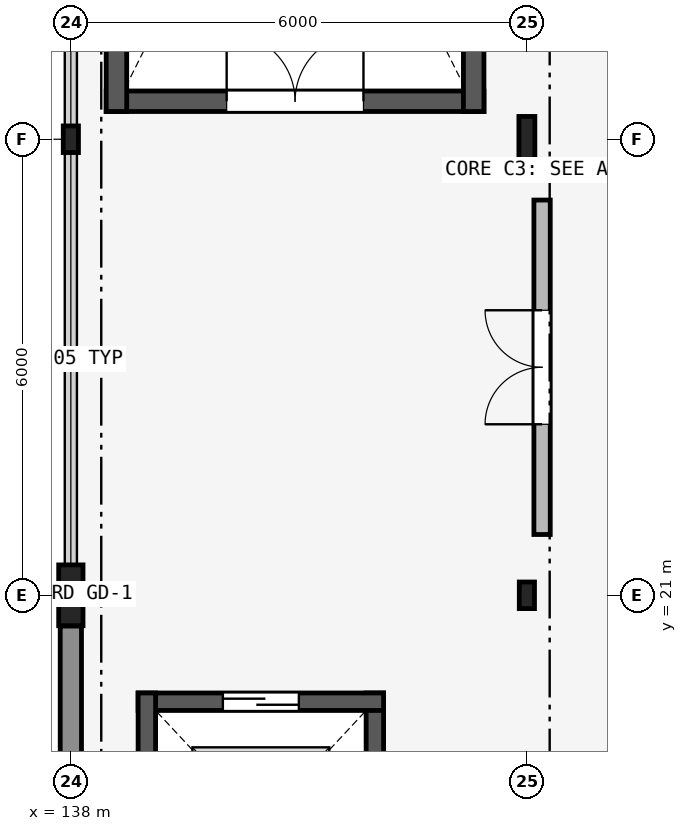
"""IFC4 building model, lengths in metres.
Left out: names, types, materials, properties, quantities, classifications, styles, units other than length and angle.
Written with IfcOpenShell. Run it as: python <this file> out.ifc"""

import sys

from ifc_helpers import new_model, si_unit, direction, frame, frame_2d, origin, origin_2d, place, context, subcontext, project, spatial, rectangle, hollow_rectangle, i_section, extrude, element, fill, save


model = new_model("IFC4")
c1 = context("Model", 3, precision=1e-05, world=origin(), true_north=direction((0.0, 1.0)))
c2 = subcontext(c1, "Body", "Model", "MODEL_VIEW")
j1 = project(units=[si_unit("LENGTHUNIT", "METRE"), si_unit("PLANEANGLEUNIT", "RADIAN")], contexts=[c1])
p1 = place(None, origin())
s1 = spatial("IfcSite", under=j1, at=p1, CompositionType="ELEMENT")
p2 = place(p1, origin())
s2 = spatial("IfcBuilding", under=s1, at=p2, CompositionType="ELEMENT")
p3 = place(p2, frame((0.0, 0.0, 9.3)))
s3 = spatial("IfcBuildingStorey", under=s2, at=p3, CompositionType="ELEMENT", Elevation=9.3)
p4 = place(p3, frame((138.0, 21.0, 0.0), z_axis=(0.0, 0.0, 1.0), x_axis=(1.0, 0.0, 0.0)))
e1 = element("IfcColumn", 1, at=p4, inside=s3, PredefinedType="COLUMN", context=c2, shape_type="SweptSolid", body=[
    extrude(i_section(OverallWidth=0.32, OverallDepth=0.8, WebThickness=0.016, FlangeThickness=0.028, at=origin_2d()), origin(), (0.0, 0.0, 1.0), 4.2),
])
for number, where, z_axis, x_axis in (
    (2, (138.0, 27.0, 0.0), (0.0, 0.0, 1.0), (1.0, 0.0, 0.0)),
    (3, (144.0, 21.0, 0.0), (0.0, 0.0, 1.0), (1.0, 0.0, 0.0)),
):
    element("IfcColumn", number, at=place(p3, frame(where, z_axis=z_axis, x_axis=x_axis)), inside=s3, PredefinedType="COLUMN", context=c2, shape_type="SweptSolid", body=[
        extrude(hollow_rectangle(XDim=0.2, YDim=0.35, WallThickness=0.012, InnerFilletRadius=0.012, OuterFilletRadius=0.024, at=origin_2d()), origin(), (0.0, 0.0, 1.0), 4.2),
    ])
p5 = place(p3, frame((144.0, 27.0, 0.0), z_axis=(0.0, 0.0, 1.0), x_axis=(1.0, 0.0, 0.0)))
e4 = element("IfcColumn", 4, at=p5, inside=s3, PredefinedType="COLUMN", context=c2, shape_type="SweptSolid", body=[
    extrude(i_section(OverallWidth=0.21, OverallDepth=0.6, WebThickness=0.012, FlangeThickness=0.021, FilletRadius=0.02, at=origin_2d()), origin(), (0.0, 0.0, 1.0), 4.2),
])
p6 = place(p3, frame((138.0, 15.304, 0.0), z_axis=(0.0, 0.0, 1.0), x_axis=(0.0, 1.0, 0.0)))
e5 = element("IfcWall", 5, at=p6, inside=s3, PredefinedType="SOLIDWALL", context=c2, shape_type="SweptSolid", body=[
    extrude(rectangle(XDim=5.292, YDim=0.28, at=frame_2d((2.646, 0.0))), origin(), (0.0, 0.0, 1.0), 3.39),
])
p7 = place(p3, frame((138.465, 27.5, 0.0), z_axis=(0.0, 0.0, 1.0), x_axis=(1.0, 0.0, 0.0)))
e6 = element("IfcWall", 6, at=p7, inside=s3, PredefinedType="SHEAR", context=c2, shape_type="SweptSolid", body=[
    extrude(rectangle(XDim=4.97, YDim=0.27, at=frame_2d((2.485, 0.0))), origin(), (0.0, 0.0, 1.0), 4.06),
])
p8 = place(p7, frame((1.585, 0.0, 0.0)))
e7 = element("IfcOpeningElement", 7, at=p8, cuts=e6, PredefinedType="OPENING", context=c2, shape_type="SweptSolid", body=[
    extrude(rectangle(XDim=1.8, YDim=2.2, at=frame_2d((0.9, 1.1))), frame((0.0, 0.145, 0.0), z_axis=(0.0, -1.0, 0.0), x_axis=(1.0, 0.0, 0.0)), (0.0, 0.0, 1.0), 0.29),
])
for number, where, z_axis, x_axis in (
    (8, (143.3, 27.365, 0.0), (0.0, 0.0, 1.0), (0.0, 1.0, 0.0)),
    (9, (138.6, 36.935, 0.0), (0.0, 0.0, 1.0), (0.0, -1.0, 0.0)),
):
    element("IfcWall", number, at=place(p3, frame(where, z_axis=z_axis, x_axis=x_axis)), inside=s3, PredefinedType="SHEAR", context=c2, shape_type="SweptSolid", body=[
        extrude(rectangle(XDim=9.57, YDim=0.27, at=frame_2d((4.785, 0.0))), origin(), (0.0, 0.0, 1.0), 4.06),
    ])
p9 = place(p3, frame((144.2, 21.8, 0.0), z_axis=(0.0, 0.0, 1.0), x_axis=(0.0, 1.0, 0.0)))
e10 = element("IfcWall", 10, at=p9, inside=s3, PredefinedType="PARTITIONING", context=c2, shape_type="SweptSolid", body=[
    extrude(rectangle(XDim=4.4, YDim=0.215, at=frame_2d((2.2, 0.0))), origin(), (0.0, 0.0, 1.0), 3.44),
])
p10 = place(p9, frame((1.45, 0.0, 0.0)))
e11 = element("IfcOpeningElement", 11, at=p10, cuts=e10, PredefinedType="OPENING", context=c2, shape_type="SweptSolid", body=[
    extrude(rectangle(XDim=1.5, YDim=2.15, at=frame_2d((0.75, 1.075))), frame((0.0, 0.117, 0.0), z_axis=(0.0, -1.0, 0.0), x_axis=(1.0, 0.0, 0.0)), (0.0, 0.0, 1.0), 0.235),
])
p11 = place(p3, frame((142.0, 16.285, 0.0), z_axis=(0.0, 0.0, 1.0), x_axis=(0.0, 1.0, 0.0)))
e12 = element("IfcWall", 12, at=p11, inside=s3, PredefinedType="SHEAR", context=c2, shape_type="SweptSolid", body=[
    extrude(rectangle(XDim=3.43, YDim=0.23, at=frame_2d((1.715, 0.0))), origin(), (0.0, 0.0, 1.0), 4.2),
])
p12 = place(p3, frame((142.115, 19.6, 0.0), z_axis=(0.0, 0.0, 1.0), x_axis=(-1.0, 0.0, 0.0)))
e13 = element("IfcWall", 13, at=p12, inside=s3, PredefinedType="SHEAR", context=c2, shape_type="SweptSolid", body=[
    extrude(rectangle(XDim=3.23, YDim=0.23, at=frame_2d((1.615, 0.0))), origin(), (0.0, 0.0, 1.0), 4.2),
])
p13 = place(p12, frame((1.115, 0.0, 0.0)))
e14 = element("IfcOpeningElement", 14, at=p13, cuts=e13, PredefinedType="OPENING", context=c2, shape_type="SweptSolid", body=[
    extrude(rectangle(XDim=1.0, YDim=2.15, at=frame_2d((0.5, 1.075))), frame((0.0, 0.125, 0.0), z_axis=(0.0, -1.0, 0.0), x_axis=(1.0, 0.0, 0.0)), (0.0, 0.0, 1.0), 0.25),
])
p14 = place(p3, frame((139.0, 19.715, 0.0), z_axis=(0.0, 0.0, 1.0), x_axis=(0.0, -1.0, 0.0)))
e15 = element("IfcWall", 15, at=p14, inside=s3, PredefinedType="SHEAR", context=c2, shape_type="SweptSolid", body=[
    extrude(rectangle(XDim=3.43, YDim=0.23, at=frame_2d((1.715, 0.0))), origin(), (0.0, 0.0, 1.0), 4.2),
])
p15 = place(p8, origin())
e16 = element("IfcDoor", 16, at=p15, inside=s3, OperationType="DOUBLE_DOOR_SINGLE_SWING", PredefinedType="DOOR", context=c2, shape_type="SweptSolid", body=[
    extrude(rectangle(XDim=1.8, YDim=2.2, at=frame_2d((0.9, 1.1))), frame((0.0, 0.025, 0.0), z_axis=(0.0, -1.0, 0.0), x_axis=(1.0, 0.0, 0.0)), (0.0, 0.0, 1.0), 0.05),
])
fill(e7, e16)
p16 = place(p10, origin())
e17 = element("IfcDoor", 17, at=p16, inside=s3, OperationType="DOUBLE_DOOR_SINGLE_SWING", PredefinedType="DOOR", context=c2, shape_type="SweptSolid", body=[
    extrude(rectangle(XDim=1.5, YDim=2.15, at=frame_2d((0.75, 1.075))), frame((0.0, 0.025, 0.0), z_axis=(0.0, -1.0, 0.0), x_axis=(1.0, 0.0, 0.0)), (0.0, 0.0, 1.0), 0.05),
])
fill(e11, e17)
p17 = place(p13, origin())
e18 = element("IfcDoor", 18, at=p17, inside=s3, OperationType="SLIDING_TO_LEFT", PredefinedType="DOOR", context=c2, shape_type="SweptSolid", body=[
    extrude(rectangle(XDim=1.0, YDim=2.15, at=frame_2d((0.5, 1.075))), frame((0.0, 0.025, 0.0), z_axis=(0.0, -1.0, 0.0), x_axis=(1.0, 0.0, 0.0)), (0.0, 0.0, 1.0), 0.05),
])
fill(e14, e18)
save(model, sys.argv[1])
